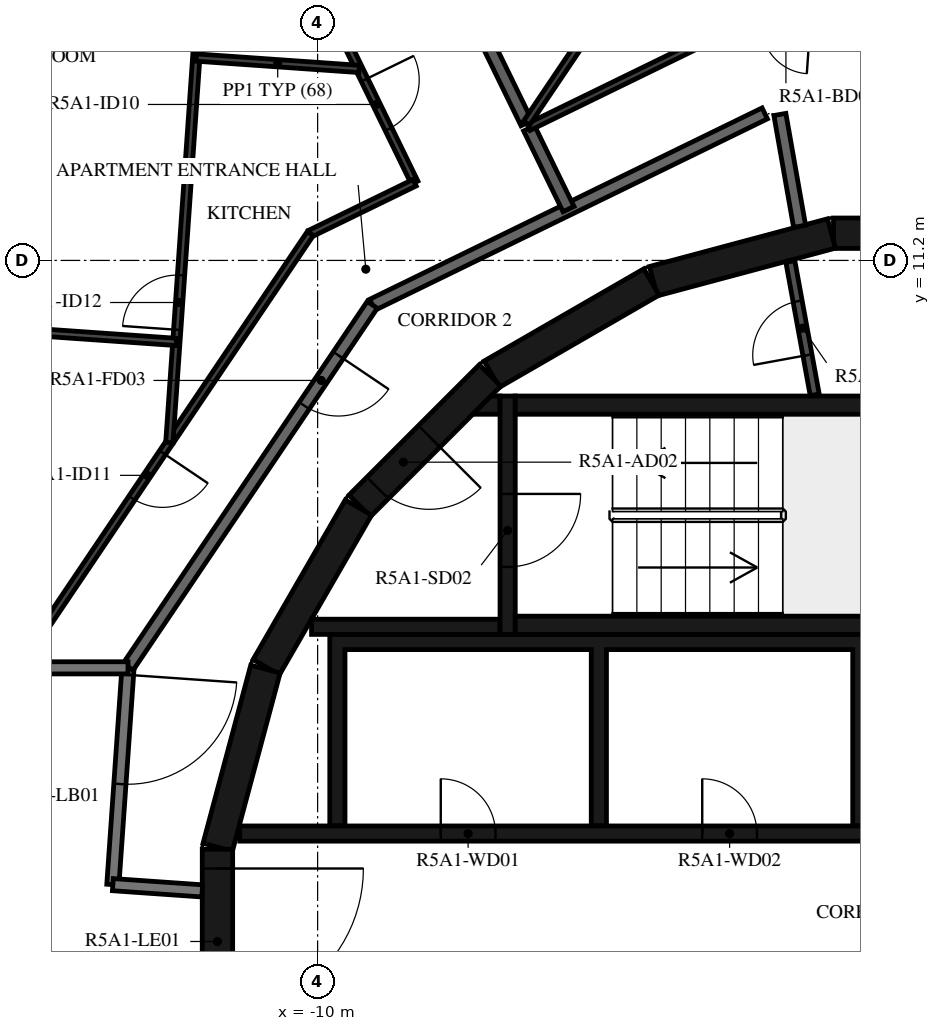
"""IFC4 building model, lengths in metres.
Left out: names, types, materials, properties, quantities, classifications, styles, units other than length and angle.
Written with IfcOpenShell. Run it as: python <this file> out.ifc"""

import sys

from ifc_helpers import new_model, si_unit, direction, frame, frame_2d, origin, place, context, subcontext, project, spatial, polyline, rectangle, outline, extrude, element, fill, save


model = new_model("IFC4")
c1 = context("Model", 3, precision=1e-05, world=origin(), true_north=direction((0.0, 1.0)))
c2 = subcontext(c1, "Body", "Model", "MODEL_VIEW")
j1 = project(units=[si_unit("LENGTHUNIT", "METRE"), si_unit("PLANEANGLEUNIT", "RADIAN")], contexts=[c1])
p1 = place(None, origin())
s1 = spatial("IfcSite", under=j1, at=p1, CompositionType="ELEMENT")
p2 = place(p1, origin())
s2 = spatial("IfcBuilding", under=s1, at=p2, CompositionType="ELEMENT")
p3 = place(p2, frame((0.0, 0.0, 191.9)))
s3 = spatial("IfcBuildingStorey", under=s2, at=p3, CompositionType="ELEMENT", Elevation=191.9)
for number, where, z_axis, x_axis in (
    (1, (1.516, 11.647, 0.0), (0.0, 0.0, 1.0), (-1.0, 0.0, 0.0)),
    (2, (-1.55, 11.643, 0.0), (0.0, 0.0, 1.0), (-0.966, -0.259, 0.0)),
    (3, (-4.51, 10.845, 0.0), (0.0, 0.0, 1.0), (-0.866, -0.5, 0.0)),
):
    element("IfcWall", number, at=place(p3, frame(where, z_axis=z_axis, x_axis=x_axis)), inside=s3, PredefinedType="SHEAR", context=c2, shape_type="SweptSolid", body=[
        extrude(rectangle(XDim=3.033, YDim=0.5, at=frame_2d((1.516, 0.0))), origin(), (0.0, 0.0, 1.0), 3.12),
    ])
p4 = place(p3, frame((-7.164, 9.308, 0.0), z_axis=(0.0, 0.0, 1.0), x_axis=(-0.707106781187, -0.707106781187, 0.0)))
e4 = element("IfcWall", 4, at=p4, inside=s3, PredefinedType="SHEAR", context=c2, shape_type="SweptSolid", body=[
    extrude(rectangle(XDim=3.032, YDim=0.5, at=frame_2d((1.516, 0.0))), origin(), (0.0, 0.0, 1.0), 3.12),
])
p5 = place(p4, frame((1.416, 0.0, 0.0)))
e5 = element("IfcOpeningElement", 5, at=p5, cuts=e4, PredefinedType="OPENING", context=c2, shape_type="SweptSolid", body=[
    extrude(rectangle(XDim=1.2, YDim=2.1, at=frame_2d((0.6, 1.05))), frame((0.0, 0.26, 0.0), z_axis=(0.0, -1.0, 0.0), x_axis=(1.0, 0.0, 0.0)), (0.0, 0.0, 1.0), 0.52),
])
for number, where, z_axis, x_axis in (
    (6, (-9.329, 7.137, 0.0), (0.0, 0.0, 1.0), (-0.5, -0.866, 0.0)),
    (7, (-10.858, 4.479, 0.0), (0.0, 0.0, 1.0), (-0.259, -0.966, 0.0)),
):
    element("IfcWall", number, at=place(p3, frame(where, z_axis=z_axis, x_axis=x_axis)), inside=s3, PredefinedType="SHEAR", context=c2, shape_type="SweptSolid", body=[
        extrude(rectangle(XDim=3.033, YDim=0.5, at=frame_2d((1.516, 0.0))), origin(), (0.0, 0.0, 1.0), 3.12),
    ])
p6 = place(p3, frame((-11.647, 1.516, 0.0), z_axis=(0.0, 0.0, 1.0), x_axis=(0.0, -1.0, 0.0)))
e8 = element("IfcWall", 8, at=p6, inside=s3, PredefinedType="SHEAR", context=c2, shape_type="SweptSolid", body=[
    extrude(rectangle(XDim=3.033, YDim=0.5, at=frame_2d((1.516, 0.0))), origin(), (0.0, 0.0, 1.0), 3.12),
])
p7 = place(p6, frame((0.316, 0.0, 0.0)))
e9 = element("IfcOpeningElement", 9, at=p7, cuts=e8, PredefinedType="OPENING", context=c2, shape_type="SweptSolid", body=[
    extrude(rectangle(XDim=2.4, YDim=2.1, at=frame_2d((1.2, 1.05))), frame((0.0, 0.26, 0.0), z_axis=(0.0, -1.0, 0.0), x_axis=(1.0, 0.0, 0.0)), (0.0, 0.0, 1.0), 0.52),
])
for number, where, z_axis, x_axis in (
    (10, (-6.75, 5.2, 0.0), (0.0, 0.0, 1.0), (1.0, 0.0, 0.0)),
    (11, (-6.75, 8.82, 0.0), (0.0, 0.0, 1.0), (1.0, 0.0, 0.0)),
):
    element("IfcWall", number, at=place(p3, frame(where, z_axis=z_axis, x_axis=x_axis)), inside=s3, PredefinedType="SHEAR", context=c2, shape_type="SweptSolid", body=[
        extrude(rectangle(XDim=6.75, YDim=0.3, at=frame_2d((3.375, 0.0))), origin(), (0.0, 0.0, 1.0), 3.12),
    ])
p8 = place(p3, frame((-6.875, 8.97, 0.0), z_axis=(0.0, 0.0, 1.0), x_axis=(0.0, -1.0, 0.0)))
e12 = element("IfcWall", 12, at=p8, inside=s3, PredefinedType="SHEAR", context=c2, shape_type="SweptSolid", body=[
    extrude(rectangle(XDim=3.92, YDim=0.25, at=frame_2d((1.96, 0.0))), origin(), (0.0, 0.0, 1.0), 3.12),
])
p9 = place(p8, frame((1.61, 0.0, 0.0)))
e13 = element("IfcOpeningElement", 13, at=p9, cuts=e12, PredefinedType="OPENING", context=c2, shape_type="SweptSolid", body=[
    extrude(rectangle(XDim=1.2, YDim=2.1, at=frame_2d((0.6, 1.05))), frame((0.0, 0.135, 0.0), z_axis=(0.0, -1.0, 0.0), x_axis=(1.0, 0.0, 0.0)), (0.0, 0.0, 1.0), 0.27),
])
p10 = place(p3, frame((-7.0, 5.175, 0.0), z_axis=(0.0, 0.0, 1.0), x_axis=(-1.0, 0.0, 0.0)))
e14 = element("IfcWall", 14, at=p10, inside=s3, PredefinedType="SHEAR", context=c2, shape_type="SweptSolid", body=[
    extrude(rectangle(XDim=3.1, YDim=0.25, at=frame_2d((1.55, 0.0))), origin(), (0.0, 0.0, 1.0), 3.12),
])
p11 = place(p3, origin())
e15 = element("IfcWall", 15, at=p11, inside=s3, PredefinedType="SHEAR", context=c2, shape_type="SweptSolid", body=[
    extrude(outline(polyline([(-7.148, 8.97), (-7.0, 8.97), (-7.0, 8.67), (-7.448, 8.67), (-7.148, 8.97)])), origin(), (0.0, 0.0, 1.0), 3.12),
])
p12 = place(p3, origin())
e16 = element("IfcWall", 16, at=p12, inside=s3, PredefinedType="SHEAR", context=c2, shape_type="SweptSolid", body=[
    extrude(outline(polyline([(-9.55, 4.8), (-5.5, 4.8), (-5.5, 1.9), (-5.25, 1.9), (-5.25, 4.8), (-1.2, 4.8), (-1.2, 1.9), (-0.95, 1.9), (-0.95, 4.8), (0.95, 4.8), (0.95, 1.9), (1.2, 1.9), (1.2, 4.8), (3.1, 4.8), (3.1, 1.9), (3.35, 1.9), (3.35, 4.8), (5.25, 4.8), (5.25, 1.9), (5.5, 1.9), (5.5, 4.8), (7.4, 4.8), (7.4, 1.9), (7.65, 1.9), (7.65, 4.8), (9.55, 4.8), (9.55, 1.9), (9.8, 1.9), (9.8, 4.8), (9.8, 5.05), (-9.8, 5.05), (-9.8, 4.8), (-9.8, 1.9), (-9.55, 1.9), (-9.55, 4.8)])), origin(), (0.0, 0.0, 1.0), 3.12),
])
p13 = place(p3, frame((-11.28, 1.775, 0.0), z_axis=(0.0, 0.0, 1.0), x_axis=(1.0, 0.0, 0.0)))
e17 = element("IfcWall", 17, at=p13, inside=s3, PredefinedType="SHEAR", context=c2, shape_type="SweptSolid", body=[
    extrude(rectangle(XDim=14.38, YDim=0.25, at=frame_2d((7.19, 0.0))), origin(), (0.0, 0.0, 1.0), 3.12),
])
p14 = place(p13, frame((10.73, 0.0, 0.0)))
e18 = element("IfcOpeningElement", 18, at=p14, cuts=e17, PredefinedType="OPENING", context=c2, shape_type="SweptSolid", body=[
    extrude(rectangle(XDim=1.1, YDim=2.1, at=frame_2d((0.55, 1.05))), frame((0.0, 0.135, 0.0), z_axis=(0.0, -1.0, 0.0), x_axis=(1.0, 0.0, 0.0)), (0.0, 0.0, 1.0), 0.27),
])
p15 = place(p13, frame((12.88, 0.0, 0.0)))
e19 = element("IfcOpeningElement", 19, at=p15, cuts=e17, PredefinedType="OPENING", context=c2, shape_type="SweptSolid", body=[
    extrude(rectangle(XDim=1.1, YDim=2.1, at=frame_2d((0.55, 1.05))), frame((0.0, 0.135, 0.0), z_axis=(0.0, -1.0, 0.0), x_axis=(1.0, 0.0, 0.0)), (0.0, 0.0, 1.0), 0.27),
])
p16 = place(p13, frame((3.305, 0.0, 0.0)))
e20 = element("IfcOpeningElement", 20, at=p16, cuts=e17, PredefinedType="OPENING", context=c2, shape_type="SweptSolid", body=[
    extrude(rectangle(XDim=0.9, YDim=2.1, at=frame_2d((0.45, 1.05))), frame((0.0, 0.135, 0.0), z_axis=(0.0, -1.0, 0.0), x_axis=(1.0, 0.0, 0.0)), (0.0, 0.0, 1.0), 0.27),
])
p17 = place(p13, frame((7.605, 0.0, 0.0)))
e21 = element("IfcOpeningElement", 21, at=p17, cuts=e17, PredefinedType="OPENING", context=c2, shape_type="SweptSolid", body=[
    extrude(rectangle(XDim=0.9, YDim=2.1, at=frame_2d((0.45, 1.05))), frame((0.0, 0.135, 0.0), z_axis=(0.0, -1.0, 0.0), x_axis=(1.0, 0.0, 0.0)), (0.0, 0.0, 1.0), 0.27),
])
p18 = place(p3, frame((-1.825, 8.99, 0.0), z_axis=(0.0, 0.0, 1.0), x_axis=(-0.179955206115, 0.983674805915, 0.0)))
e22 = element("IfcWall", 22, at=p18, inside=s3, PredefinedType="PARTITIONING", context=c2, shape_type="SweptSolid", body=[
    extrude(rectangle(XDim=2.229, YDim=0.15, at=frame_2d((1.115, 0.0))), origin(), (0.0, 0.0, 1.0), 3.12),
])
p19 = place(p18, frame((0.665, 0.0, 0.0)))
e23 = element("IfcOpeningElement", 23, at=p19, cuts=e22, PredefinedType="OPENING", context=c2, shape_type="SweptSolid", body=[
    extrude(rectangle(XDim=0.9, YDim=2.1, at=frame_2d((0.45, 1.05))), frame((0.0, 0.085, 0.0), z_axis=(0.0, -1.0, 0.0), x_axis=(1.0, 0.0, 0.0)), (0.0, 0.0, 1.0), 0.17),
])
p20 = place(p3, frame((-13.118, 4.5, 0.0), z_axis=(0.0, 0.0, 1.0), x_axis=(-0.069746872611, -0.99756472159, 0.0)))
e24 = element("IfcWall", 24, at=p20, inside=s3, PredefinedType="STANDARD", context=c2, shape_type="SweptSolid", body=[
    extrude(rectangle(XDim=3.574, YDim=0.2, at=frame_2d((1.787, 0.0))), origin(), (0.0, 0.0, 1.0), 3.12),
])
p21 = place(p20, frame((0.115, 0.0, 0.0)))
e25 = element("IfcOpeningElement", 25, at=p21, cuts=e24, PredefinedType="OPENING", context=c2, shape_type="SweptSolid", body=[
    extrude(rectangle(XDim=1.8, YDim=2.1, at=frame_2d((0.9, 1.05))), frame((0.0, 0.11, 0.0), z_axis=(0.0, -1.0, 0.0), x_axis=(1.0, 0.0, 0.0)), (0.0, 0.0, 1.0), 0.22),
])
p22 = place(p3, frame((-13.367, 0.935, 0.0), z_axis=(0.0, 0.0, 1.0), x_axis=(0.997553656289, -0.069904955655, 0.0)))
e26 = element("IfcWall", 26, at=p22, inside=s3, PredefinedType="STANDARD", context=c2, shape_type="SweptSolid", body=[
    extrude(rectangle(XDim=1.474, YDim=0.2, at=frame_2d((0.737, 0.0))), origin(), (0.0, 0.0, 1.0), 3.12),
])
p23 = place(p3, frame((-2.074, 11.761, 0.0), z_axis=(0.0, 0.0, 1.0), x_axis=(-0.173740587112, 0.984791454263, 0.0)))
e27 = element("IfcWall", 27, at=p23, inside=s3, PredefinedType="STANDARD", context=c2, shape_type="SweptSolid", body=[
    extrude(rectangle(XDim=1.867, YDim=0.2, at=frame_2d((0.934, 0.0))), origin(), (0.0, 0.0, 1.0), 3.12),
])
p24 = place(p3, frame((-2.647, 13.618, 0.0), z_axis=(0.0, 0.0, 1.0), x_axis=(-0.898796543751, -0.438366026218, 0.0)))
e28 = element("IfcWall", 28, at=p24, inside=s3, PredefinedType="STANDARD", context=c2, shape_type="SweptSolid", body=[
    extrude(rectangle(XDim=7.181, YDim=0.2, at=frame_2d((3.591, 0.0))), origin(), (0.0, 0.0, 1.0), 3.12),
])
p25 = place(p3, frame((-9.101, 10.47, 0.0), z_axis=(0.0, 0.0, 1.0), x_axis=(-0.559195469534, -0.829035841718, 0.0)))
e29 = element("IfcWall", 29, at=p25, inside=s3, PredefinedType="STANDARD", context=c2, shape_type="SweptSolid", body=[
    extrude(rectangle(XDim=7.181, YDim=0.2, at=frame_2d((3.591, 0.0))), origin(), (0.0, 0.0, 1.0), 3.12),
])
p26 = place(p25, frame((1.0, 0.0, 0.0)))
e30 = element("IfcOpeningElement", 30, at=p26, cuts=e29, PredefinedType="OPENING", context=c2, shape_type="SweptSolid", body=[
    extrude(rectangle(XDim=1.0, YDim=2.1, at=frame_2d((0.5, 1.05))), frame((0.0, 0.11, 0.0), z_axis=(0.0, -1.0, 0.0), x_axis=(1.0, 0.0, 0.0)), (0.0, 0.0, 1.0), 0.22),
])
p27 = place(p3, frame((-13.118, 4.5, 0.0), z_axis=(0.0, 0.0, 1.0), x_axis=(-1.0, 0.0, 0.0)))
e31 = element("IfcWall", 31, at=p27, inside=s3, PredefinedType="STANDARD", context=c2, shape_type="SweptSolid", body=[
    extrude(rectangle(XDim=4.782, YDim=0.2, at=frame_2d((2.391, 0.0))), origin(), (0.0, 0.0, 1.0), 3.12),
])
p28 = place(p3, frame((-6.522, 13.373, 0.0), z_axis=(0.0, 0.0, 1.0), x_axis=(0.438277270821, -0.8988398266, 0.0)))
e32 = element("IfcWall", 32, at=p28, inside=s3, PredefinedType="STANDARD", context=c2, shape_type="SweptSolid", body=[
    extrude(rectangle(XDim=1.479, YDim=0.2, at=frame_2d((0.74, 0.0))), origin(), (0.0, 0.0, 1.0), 3.12),
])
p29 = place(p3, frame((-8.219, 16.851, 0.0), z_axis=(0.0, 0.0, 1.0), x_axis=(0.438291091101, -0.898833087654, 0.0)))
e33 = element("IfcWall", 33, at=p29, inside=s3, PredefinedType="STANDARD", context=c2, shape_type="SweptSolid", body=[
    extrude(rectangle(XDim=3.774, YDim=0.2, at=frame_2d((1.887, 0.0))), origin(), (0.0, 0.0, 1.0), 3.12),
])
p30 = place(p3, frame((5.022, 14.585, 0.0), z_axis=(0.0, 0.0, 1.0), x_axis=(-0.997565118395, 0.069741197017, 0.0)))
e34 = element("IfcWall", 34, at=p30, inside=s3, PredefinedType="PARTITIONING", context=c2, shape_type="SweptSolid", body=[
    extrude(rectangle(XDim=7.985, YDim=0.12, at=frame_2d((3.993, 0.0))), origin(), (0.0, 0.0, 1.0), 3.12),
])
p31 = place(p30, frame((2.875, 0.0, 0.0)))
e35 = element("IfcOpeningElement", 35, at=p31, cuts=e34, PredefinedType="OPENING", context=c2, shape_type="SweptSolid", body=[
    extrude(rectangle(XDim=0.9, YDim=2.1, at=frame_2d((0.45, 1.05))), frame((0.0, 0.07, 0.0), z_axis=(0.0, -1.0, 0.0), x_axis=(1.0, 0.0, 0.0)), (0.0, 0.0, 1.0), 0.14),
])
p32 = place(p30, frame((6.938, 0.0, 0.0)))
e36 = element("IfcOpeningElement", 36, at=p32, cuts=e34, PredefinedType="OPENING", context=c2, shape_type="SweptSolid", body=[
    extrude(rectangle(XDim=0.8, YDim=2.1, at=frame_2d((0.4, 1.05))), frame((0.0, 0.07, 0.0), z_axis=(0.0, -1.0, 0.0), x_axis=(1.0, 0.0, 0.0)), (0.0, 0.0, 1.0), 0.14),
])
p33 = place(p3, frame((-2.943, 15.142, 0.0), z_axis=(0.0, 0.0, 1.0), x_axis=(-0.89881075705, -0.438336883014, 0.0)))
e37 = element("IfcWall", 37, at=p33, inside=s3, PredefinedType="PARTITIONING", context=c2, shape_type="SweptSolid", body=[
    extrude(rectangle(XDim=3.992, YDim=0.12, at=frame_2d((1.996, 0.0))), origin(), (0.0, 0.0, 1.0), 3.12),
])
p34 = place(p3, frame((-3.939, 17.35, 0.0), z_axis=(0.0, 0.0, 1.0), x_axis=(-0.559193216274, -0.829037361566, 0.0)))
e38 = element("IfcWall", 38, at=p34, inside=s3, PredefinedType="PARTITIONING", context=c2, shape_type="SweptSolid", body=[
    extrude(rectangle(XDim=4.694, YDim=0.12, at=frame_2d((2.347, 0.0))), origin(), (0.0, 0.0, 1.0), 3.12),
])
p35 = place(p3, frame((-10.5, 16.775, 0.0), z_axis=(0.0, 0.0, 1.0), x_axis=(0.438345136783, -0.898806731761, 0.0)))
e39 = element("IfcWall", 39, at=p35, inside=s3, PredefinedType="PARTITIONING", context=c2, shape_type="SweptSolid", body=[
    extrude(rectangle(XDim=4.78, YDim=0.12, at=frame_2d((2.39, 0.0))), origin(), (0.0, 0.0, 1.0), 3.12),
])
p36 = place(p35, frame((0.7, 0.0, 0.0)))
e40 = element("IfcOpeningElement", 40, at=p36, cuts=e39, PredefinedType="OPENING", context=c2, shape_type="SweptSolid", body=[
    extrude(rectangle(XDim=0.8, YDim=2.1, at=frame_2d((0.4, 1.05))), frame((0.0, 0.07, 0.0), z_axis=(0.0, -1.0, 0.0), x_axis=(1.0, 0.0, 0.0)), (0.0, 0.0, 1.0), 0.14),
])
p37 = place(p35, frame((2.899, 0.0, 0.0)))
e41 = element("IfcOpeningElement", 41, at=p37, cuts=e39, PredefinedType="OPENING", context=c2, shape_type="SweptSolid", body=[
    extrude(rectangle(XDim=0.9, YDim=2.1, at=frame_2d((0.45, 1.05))), frame((0.0, 0.07, 0.0), z_axis=(0.0, -1.0, 0.0), x_axis=(1.0, 0.0, 0.0)), (0.0, 0.0, 1.0), 0.14),
])
p38 = place(p3, frame((-8.405, 12.479, 0.0), z_axis=(0.0, 0.0, 1.0), x_axis=(-0.898784427692, -0.438390867307, 0.0)))
e42 = element("IfcWall", 42, at=p38, inside=s3, PredefinedType="PARTITIONING", context=c2, shape_type="SweptSolid", body=[
    extrude(rectangle(XDim=1.908, YDim=0.12, at=frame_2d((0.954, 0.0))), origin(), (0.0, 0.0, 1.0), 3.12),
])
p39 = place(p3, frame((-10.12, 11.642, 0.0), z_axis=(0.0, 0.0, 1.0), x_axis=(-0.55920080659, -0.829032241779, 0.0)))
e43 = element("IfcWall", 43, at=p39, inside=s3, PredefinedType="PARTITIONING", context=c2, shape_type="SweptSolid", body=[
    extrude(rectangle(XDim=7.985, YDim=0.12, at=frame_2d((3.992, 0.0))), origin(), (0.0, 0.0, 1.0), 3.12),
])
p40 = place(p39, frame((4.346, 0.0, 0.0)))
e44 = element("IfcOpeningElement", 44, at=p40, cuts=e43, PredefinedType="OPENING", context=c2, shape_type="SweptSolid", body=[
    extrude(rectangle(XDim=0.9, YDim=2.1, at=frame_2d((0.45, 1.05))), frame((0.0, 0.07, 0.0), z_axis=(0.0, -1.0, 0.0), x_axis=(1.0, 0.0, 0.0)), (0.0, 0.0, 1.0), 0.14),
])
p41 = place(p3, frame((-12.439, 8.204, 0.0), z_axis=(0.0, 0.0, 1.0), x_axis=(0.069750037523, 0.997564500303, 0.0)))
e45 = element("IfcWall", 45, at=p41, inside=s3, PredefinedType="PARTITIONING", context=c2, shape_type="SweptSolid", body=[
    extrude(rectangle(XDim=10.014, YDim=0.12, at=frame_2d((5.007, 0.0))), origin(), (0.0, 0.0, 1.0), 3.12),
])
p42 = place(p41, frame((1.859, 0.0, 0.0)))
e46 = element("IfcOpeningElement", 46, at=p42, cuts=e45, PredefinedType="OPENING", context=c2, shape_type="SweptSolid", body=[
    extrude(rectangle(XDim=0.9, YDim=2.1, at=frame_2d((0.45, 1.05))), frame((0.0, 0.07, 0.0), z_axis=(0.0, -1.0, 0.0), x_axis=(1.0, 0.0, 0.0)), (0.0, 0.0, 1.0), 0.14),
])
p43 = place(p3, frame((-11.996, 14.536, 0.0), z_axis=(0.0, 0.0, 1.0), x_axis=(0.997565991425, -0.069728708231, 0.0)))
e47 = element("IfcWall", 47, at=p43, inside=s3, PredefinedType="PARTITIONING", context=c2, shape_type="SweptSolid", body=[
    extrude(rectangle(XDim=2.686, YDim=0.12, at=frame_2d((1.343, 0.0))), origin(), (0.0, 0.0, 1.0), 3.12),
])
p44 = place(p3, frame((-17.51, 10.222, 0.0), z_axis=(0.0, 0.0, 1.0), x_axis=(0.997563184303, -0.069768856397, 0.0)))
e48 = element("IfcWall", 48, at=p44, inside=s3, PredefinedType="PARTITIONING", context=c2, shape_type="SweptSolid", body=[
    extrude(rectangle(XDim=5.2, YDim=0.12, at=frame_2d((2.6, 0.0))), origin(), (0.0, 0.0, 1.0), 2.73),
])
p45 = place(p9, origin())
e49 = element("IfcDoor", 49, at=p45, inside=s3, OperationType="SINGLE_SWING_LEFT", PredefinedType="DOOR", context=c2, shape_type="SweptSolid", body=[
    extrude(rectangle(XDim=1.2, YDim=2.1, at=frame_2d((0.6, 1.05))), frame((0.0, 0.025, 0.0), z_axis=(0.0, -1.0, 0.0), x_axis=(1.0, 0.0, 0.0)), (0.0, 0.0, 1.0), 0.05),
])
fill(e13, e49)
p46 = place(p5, origin())
e50 = element("IfcDoor", 50, at=p46, inside=s3, OperationType="SINGLE_SWING_RIGHT", PredefinedType="DOOR", context=c2, shape_type="SweptSolid", body=[
    extrude(rectangle(XDim=1.2, YDim=2.1, at=frame_2d((0.6, 1.05))), frame((0.0, 0.025, 0.0), z_axis=(0.0, -1.0, 0.0), x_axis=(1.0, 0.0, 0.0)), (0.0, 0.0, 1.0), 0.05),
])
fill(e5, e50)
p47 = place(p7, origin())
e51 = element("IfcDoor", 51, at=p47, inside=s3, OperationType="DOUBLE_DOOR_SINGLE_SWING", PredefinedType="DOOR", context=c2, shape_type="SweptSolid", body=[
    extrude(rectangle(XDim=2.4, YDim=2.1, at=frame_2d((1.2, 1.05))), frame((0.0, 0.025, 0.0), z_axis=(0.0, -1.0, 0.0), x_axis=(1.0, 0.0, 0.0)), (0.0, 0.0, 1.0), 0.05),
])
fill(e9, e51)
p48 = place(p16, origin())
e52 = element("IfcDoor", 52, at=p48, inside=s3, OperationType="SINGLE_SWING_LEFT", PredefinedType="DOOR", context=c2, shape_type="SweptSolid", body=[
    extrude(rectangle(XDim=0.9, YDim=2.1, at=frame_2d((0.45, 1.05))), frame((0.0, 0.025, 0.0), z_axis=(0.0, -1.0, 0.0), x_axis=(1.0, 0.0, 0.0)), (0.0, 0.0, 1.0), 0.05),
])
fill(e20, e52)
p49 = place(p17, origin())
e53 = element("IfcDoor", 53, at=p49, inside=s3, OperationType="SINGLE_SWING_RIGHT", PredefinedType="DOOR", context=c2, shape_type="SweptSolid", body=[
    extrude(rectangle(XDim=0.9, YDim=2.1, at=frame_2d((0.45, 1.05))), frame((0.0, 0.025, 0.0), z_axis=(0.0, -1.0, 0.0), x_axis=(1.0, 0.0, 0.0)), (0.0, 0.0, 1.0), 0.05),
])
fill(e21, e53)
p50 = place(p19, origin())
e54 = element("IfcDoor", 54, at=p50, inside=s3, OperationType="SINGLE_SWING_LEFT", PredefinedType="DOOR", context=c2, shape_type="SweptSolid", body=[
    extrude(rectangle(XDim=0.9, YDim=2.1, at=frame_2d((0.45, 1.05))), frame((0.0, 0.025, 0.0), z_axis=(0.0, -1.0, 0.0), x_axis=(1.0, 0.0, 0.0)), (0.0, 0.0, 1.0), 0.05),
])
fill(e23, e54)
p51 = place(p26, origin())
e55 = element("IfcDoor", 55, at=p51, inside=s3, OperationType="SINGLE_SWING_LEFT", PredefinedType="DOOR", context=c2, shape_type="SweptSolid", body=[
    extrude(rectangle(XDim=1.0, YDim=2.1, at=frame_2d((0.5, 1.05))), frame((0.0, 0.025, 0.0), z_axis=(0.0, -1.0, 0.0), x_axis=(1.0, 0.0, 0.0)), (0.0, 0.0, 1.0), 0.05),
])
fill(e30, e55)
p52 = place(p37, origin())
e56 = element("IfcDoor", 56, at=p52, inside=s3, OperationType="SINGLE_SWING_LEFT", PredefinedType="DOOR", context=c2, shape_type="SweptSolid", body=[
    extrude(rectangle(XDim=0.9, YDim=2.1, at=frame_2d((0.45, 1.05))), frame((0.0, 0.025, 0.0), z_axis=(0.0, -1.0, 0.0), x_axis=(1.0, 0.0, 0.0)), (0.0, 0.0, 1.0), 0.05),
])
fill(e41, e56)
p53 = place(p40, origin())
e57 = element("IfcDoor", 57, at=p53, inside=s3, OperationType="SINGLE_SWING_LEFT", PredefinedType="DOOR", context=c2, shape_type="SweptSolid", body=[
    extrude(rectangle(XDim=0.9, YDim=2.1, at=frame_2d((0.45, 1.05))), frame((0.0, 0.025, 0.0), z_axis=(0.0, -1.0, 0.0), x_axis=(1.0, 0.0, 0.0)), (0.0, 0.0, 1.0), 0.05),
])
fill(e44, e57)
p54 = place(p42, origin())
e58 = element("IfcDoor", 58, at=p54, inside=s3, OperationType="SINGLE_SWING_LEFT", PredefinedType="DOOR", context=c2, shape_type="SweptSolid", body=[
    extrude(rectangle(XDim=0.9, YDim=2.1, at=frame_2d((0.45, 1.05))), frame((0.0, 0.025, 0.0), z_axis=(0.0, -1.0, 0.0), x_axis=(1.0, 0.0, 0.0)), (0.0, 0.0, 1.0), 0.05),
])
fill(e46, e58)
p55 = place(p21, origin())
e59 = element("IfcDoor", 59, at=p55, inside=s3, OperationType="DOUBLE_DOOR_SINGLE_SWING", PredefinedType="DOOR", context=c2, shape_type="SweptSolid", body=[
    extrude(rectangle(XDim=1.8, YDim=2.1, at=frame_2d((0.9, 1.05))), frame((0.0, 0.025, 0.0), z_axis=(0.0, -1.0, 0.0), x_axis=(1.0, 0.0, 0.0)), (0.0, 0.0, 1.0), 0.05),
])
fill(e25, e59)
save(model, sys.argv[1])
